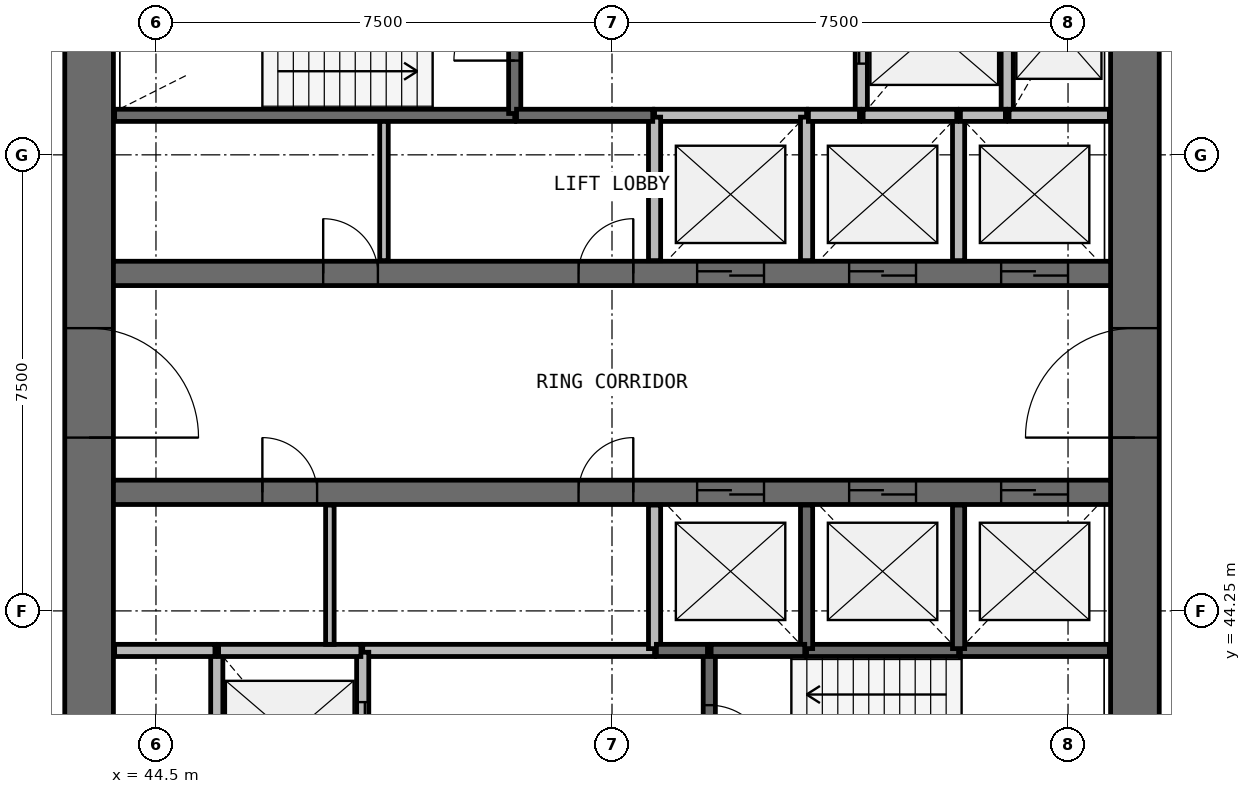
"""IFC4 building model, lengths in metres.
Left out: names, types, materials, properties, quantities, classifications, styles, units other than length and angle.
Written with IfcOpenShell. Run it as: python <this file> out.ifc"""

import sys

from ifc_helpers import new_model, si_unit, direction, frame, frame_2d, origin, place, context, subcontext, project, spatial, rectangle, extrude, source, transform, mapped, element, fill, save


model = new_model("IFC4")
c1 = context("Model", 3, precision=1e-05, world=origin(), true_north=direction((0.0, 1.0)))
c2 = subcontext(c1, "Body", "Model", "MODEL_VIEW")
j1 = project(units=[si_unit("LENGTHUNIT", "METRE"), si_unit("PLANEANGLEUNIT", "RADIAN")], contexts=[c1])
p1 = place(None, origin())
s1 = spatial("IfcSite", under=j1, at=p1, CompositionType="ELEMENT")
p2 = place(p1, origin())
s2 = spatial("IfcBuilding", under=s1, at=p2, CompositionType="ELEMENT")
p3 = place(p2, frame((0.0, 0.0, 152.6)))
s3 = spatial("IfcBuildingStorey", under=s2, at=p3, CompositionType="ELEMENT", Elevation=152.6)
p4 = place(p3, frame((60.6, 40.0, 0.0), z_axis=(0.0, 0.0, 1.0), x_axis=(0.0, 1.0, 0.0)))
e1 = element("IfcWall", 1, at=p4, inside=s3, PredefinedType="SHEAR", context=c2, shape_type="SweptSolid", body=[
    extrude(rectangle(XDim=16.0, YDim=0.8, at=frame_2d((8.0, 0.0))), origin(), (0.0, 0.0, 1.0), 3.9),
])
p5 = place(p4, frame((7.1, 0.0, 0.0)))
e2 = element("IfcOpeningElement", 2, at=p5, cuts=e1, PredefinedType="OPENING", context=c2, shape_type="SweptSolid", body=[
    extrude(rectangle(XDim=1.8, YDim=2.1, at=frame_2d((0.9, 1.05))), frame((0.0, 0.41, 0.0), z_axis=(0.0, -1.0, 0.0), x_axis=(1.0, 0.0, 0.0)), (0.0, 0.0, 1.0), 0.82),
])
p6 = place(p3, frame((43.4, 56.0, 0.0), z_axis=(0.0, 0.0, 1.0), x_axis=(0.0, -1.0, 0.0)))
e3 = element("IfcWall", 3, at=p6, inside=s3, PredefinedType="SHEAR", context=c2, shape_type="SweptSolid", body=[
    extrude(rectangle(XDim=16.0, YDim=0.8, at=frame_2d((8.0, 0.0))), origin(), (0.0, 0.0, 1.0), 3.9),
])
p7 = place(p6, frame((7.1, 0.0, 0.0)))
e4 = element("IfcOpeningElement", 4, at=p7, cuts=e3, PredefinedType="OPENING", context=c2, shape_type="SweptSolid", body=[
    extrude(rectangle(XDim=1.8, YDim=2.1, at=frame_2d((0.9, 1.05))), frame((0.0, 0.41, 0.0), z_axis=(0.0, -1.0, 0.0), x_axis=(1.0, 0.0, 0.0)), (0.0, 0.0, 1.0), 0.82),
])
p8 = place(p3, frame((43.8, 49.8, 0.0), z_axis=(0.0, 0.0, 1.0), x_axis=(1.0, 0.0, 0.0)))
e5 = element("IfcWall", 5, at=p8, inside=s3, PredefinedType="SHEAR", context=c2, shape_type="SweptSolid", body=[
    extrude(rectangle(XDim=16.4, YDim=0.4, at=frame_2d((8.2, 0.0))), origin(), (0.0, 0.0, 1.0), 3.9),
])
p9 = place(p8, frame((9.6, 0.0, 0.0)))
e6 = element("IfcOpeningElement", 6, at=p9, cuts=e5, PredefinedType="OPENING", context=c2, shape_type="SweptSolid", body=[
    extrude(rectangle(XDim=1.1, YDim=2.1, at=frame_2d((0.55, 1.05))), frame((0.0, 0.21, 0.0), z_axis=(0.0, -1.0, 0.0), x_axis=(1.0, 0.0, 0.0)), (0.0, 0.0, 1.0), 0.42),
])
p10 = place(p8, frame((12.1, 0.0, 0.0)))
e7 = element("IfcOpeningElement", 7, at=p10, cuts=e5, PredefinedType="OPENING", context=c2, shape_type="SweptSolid", body=[
    extrude(rectangle(XDim=1.1, YDim=2.1, at=frame_2d((0.55, 1.05))), frame((0.0, 0.21, 0.0), z_axis=(0.0, -1.0, 0.0), x_axis=(1.0, 0.0, 0.0)), (0.0, 0.0, 1.0), 0.42),
])
p11 = place(p8, frame((14.6, 0.0, 0.0)))
e8 = element("IfcOpeningElement", 8, at=p11, cuts=e5, PredefinedType="OPENING", context=c2, shape_type="SweptSolid", body=[
    extrude(rectangle(XDim=1.1, YDim=2.1, at=frame_2d((0.55, 1.05))), frame((0.0, 0.21, 0.0), z_axis=(0.0, -1.0, 0.0), x_axis=(1.0, 0.0, 0.0)), (0.0, 0.0, 1.0), 0.42),
])
p12 = place(p8, frame((3.45, 0.0, 0.0)))
e9 = element("IfcOpeningElement", 9, at=p12, cuts=e5, PredefinedType="OPENING", context=c2, shape_type="SweptSolid", body=[
    extrude(rectangle(XDim=0.9, YDim=2.1, at=frame_2d((0.45, 1.05))), frame((0.0, 0.21, 0.0), z_axis=(0.0, -1.0, 0.0), x_axis=(1.0, 0.0, 0.0)), (0.0, 0.0, 1.0), 0.42),
])
p13 = place(p8, frame((7.65, 0.0, 0.0)))
e10 = element("IfcOpeningElement", 10, at=p13, cuts=e5, PredefinedType="OPENING", context=c2, shape_type="SweptSolid", body=[
    extrude(rectangle(XDim=0.9, YDim=2.1, at=frame_2d((0.45, 1.05))), frame((0.0, 0.21, 0.0), z_axis=(0.0, -1.0, 0.0), x_axis=(1.0, 0.0, 0.0)), (0.0, 0.0, 1.0), 0.42),
])
p14 = place(p3, frame((43.8, 46.2, 0.0), z_axis=(0.0, 0.0, 1.0), x_axis=(1.0, 0.0, 0.0)))
e11 = element("IfcWall", 11, at=p14, inside=s3, PredefinedType="SHEAR", context=c2, shape_type="SweptSolid", body=[
    extrude(rectangle(XDim=16.4, YDim=0.4, at=frame_2d((8.2, 0.0))), origin(), (0.0, 0.0, 1.0), 3.9),
])
p15 = place(p14, frame((9.6, 0.0, 0.0)))
e12 = element("IfcOpeningElement", 12, at=p15, cuts=e11, PredefinedType="OPENING", context=c2, shape_type="SweptSolid", body=[
    extrude(rectangle(XDim=1.1, YDim=2.1, at=frame_2d((0.55, 1.05))), frame((0.0, 0.21, 0.0), z_axis=(0.0, -1.0, 0.0), x_axis=(1.0, 0.0, 0.0)), (0.0, 0.0, 1.0), 0.42),
])
p16 = place(p14, frame((12.1, 0.0, 0.0)))
e13 = element("IfcOpeningElement", 13, at=p16, cuts=e11, PredefinedType="OPENING", context=c2, shape_type="SweptSolid", body=[
    extrude(rectangle(XDim=1.1, YDim=2.1, at=frame_2d((0.55, 1.05))), frame((0.0, 0.21, 0.0), z_axis=(0.0, -1.0, 0.0), x_axis=(1.0, 0.0, 0.0)), (0.0, 0.0, 1.0), 0.42),
])
p17 = place(p14, frame((14.6, 0.0, 0.0)))
e14 = element("IfcOpeningElement", 14, at=p17, cuts=e11, PredefinedType="OPENING", context=c2, shape_type="SweptSolid", body=[
    extrude(rectangle(XDim=1.1, YDim=2.1, at=frame_2d((0.55, 1.05))), frame((0.0, 0.21, 0.0), z_axis=(0.0, -1.0, 0.0), x_axis=(1.0, 0.0, 0.0)), (0.0, 0.0, 1.0), 0.42),
])
p18 = place(p14, frame((2.45, 0.0, 0.0)))
e15 = element("IfcOpeningElement", 15, at=p18, cuts=e11, PredefinedType="OPENING", context=c2, shape_type="SweptSolid", body=[
    extrude(rectangle(XDim=0.9, YDim=2.1, at=frame_2d((0.45, 1.05))), frame((0.0, 0.21, 0.0), z_axis=(0.0, -1.0, 0.0), x_axis=(1.0, 0.0, 0.0)), (0.0, 0.0, 1.0), 0.42),
])
p19 = place(p14, frame((7.65, 0.0, 0.0)))
e16 = element("IfcOpeningElement", 16, at=p19, cuts=e11, PredefinedType="OPENING", context=c2, shape_type="SweptSolid", body=[
    extrude(rectangle(XDim=0.9, YDim=2.1, at=frame_2d((0.45, 1.05))), frame((0.0, 0.21, 0.0), z_axis=(0.0, -1.0, 0.0), x_axis=(1.0, 0.0, 0.0)), (0.0, 0.0, 1.0), 0.42),
])
p20 = place(p3, frame((43.82, 52.4, 0.0), z_axis=(0.0, 0.0, 1.0), x_axis=(1.0, 0.0, 0.0)))
e17 = element("IfcWall", 17, at=p20, inside=s3, PredefinedType="SOLIDWALL", context=c2, shape_type="SweptSolid", body=[
    extrude(rectangle(XDim=6.58, YDim=0.2, at=frame_2d((3.29, 0.0))), origin(), (0.0, 0.0, 1.0), 3.58),
])
p21 = place(p3, frame((52.7, 43.6, 0.0), z_axis=(0.0, 0.0, 1.0), x_axis=(-1.0, 0.0, 0.0)))
e18 = element("IfcWall", 18, at=p21, inside=s3, PredefinedType="SOLIDWALL", context=c2, shape_type="SweptSolid", body=[
    extrude(rectangle(XDim=4.8, YDim=0.2, at=frame_2d((2.4, 0.0))), origin(), (0.0, 0.0, 1.0), 3.58),
])
p22 = place(p3, frame((45.5, 43.6, 0.0), z_axis=(0.0, 0.0, 1.0), x_axis=(0.0, -1.0, 0.0)))
e19 = element("IfcWall", 19, at=p22, inside=s3, PredefinedType="SOLIDWALL", context=c2, shape_type="SweptSolid", body=[
    extrude(rectangle(XDim=2.78, YDim=0.2, at=frame_2d((1.39, 0.0))), origin(), (0.0, 0.0, 1.0), 3.58),
])
p23 = place(p3, frame((47.9, 40.82, 0.0), z_axis=(0.0, 0.0, 1.0), x_axis=(0.0, 1.0, 0.0)))
e20 = element("IfcWall", 20, at=p23, inside=s3, PredefinedType="SOLIDWALL", context=c2, shape_type="SweptSolid", body=[
    extrude(rectangle(XDim=2.75, YDim=0.2, at=frame_2d((1.375, 0.0))), origin(), (0.0, 0.0, 1.0), 3.58),
])
p24 = place(p23, frame((0.83, 0.0, 0.0)))
e21 = element("IfcOpeningElement", 21, at=p24, cuts=e20, PredefinedType="OPENING", context=c2, shape_type="SweptSolid", body=[
    extrude(rectangle(XDim=1.1, YDim=2.1, at=frame_2d((0.55, 1.05))), frame((0.0, 0.11, 0.0), z_axis=(0.0, -1.0, 0.0), x_axis=(1.0, 0.0, 0.0)), (0.0, 0.0, 1.0), 0.22),
])
p25 = place(p3, frame((50.4, 52.43, 0.0), z_axis=(0.0, 0.0, 1.0), x_axis=(0.0, 1.0, 0.0)))
e22 = element("IfcWall", 22, at=p25, inside=s3, PredefinedType="SOLIDWALL", context=c2, shape_type="SweptSolid", body=[
    extrude(rectangle(XDim=2.75, YDim=0.2, at=frame_2d((1.375, 0.0))), origin(), (0.0, 0.0, 1.0), 3.58),
])
p26 = place(p25, frame((0.87, 0.0, 0.0)))
e23 = element("IfcOpeningElement", 23, at=p26, cuts=e22, PredefinedType="OPENING", context=c2, shape_type="SweptSolid", body=[
    extrude(rectangle(XDim=1.0, YDim=2.1, at=frame_2d((0.5, 1.05))), frame((0.0, 0.11, 0.0), z_axis=(0.0, -1.0, 0.0), x_axis=(1.0, 0.0, 0.0)), (0.0, 0.0, 1.0), 0.22),
])
p27 = place(p3, frame((53.6, 43.6, 0.0), z_axis=(0.0, 0.0, 1.0), x_axis=(0.0, -1.0, 0.0)))
e24 = element("IfcWall", 24, at=p27, inside=s3, PredefinedType="SOLIDWALL", context=c2, shape_type="SweptSolid", body=[
    extrude(rectangle(XDim=2.78, YDim=0.2, at=frame_2d((1.39, 0.0))), origin(), (0.0, 0.0, 1.0), 3.58),
])
p28 = place(p27, frame((0.9, 0.0, 0.0)))
e25 = element("IfcOpeningElement", 25, at=p28, cuts=e24, PredefinedType="OPENING", context=c2, shape_type="SweptSolid", body=[
    extrude(rectangle(XDim=1.0, YDim=2.1, at=frame_2d((0.5, 1.05))), frame((0.0, 0.11, 0.0), z_axis=(0.0, -1.0, 0.0), x_axis=(1.0, 0.0, 0.0)), (0.0, 0.0, 1.0), 0.22),
])
p29 = place(p3, frame((56.1, 55.18, 0.0), z_axis=(0.0, 0.0, 1.0), x_axis=(0.0, -1.0, 0.0)))
e26 = element("IfcWall", 26, at=p29, inside=s3, PredefinedType="SOLIDWALL", context=c2, shape_type="SweptSolid", body=[
    extrude(rectangle(XDim=2.78, YDim=0.2, at=frame_2d((1.39, 0.0))), origin(), (0.0, 0.0, 1.0), 3.58),
])
p30 = place(p29, frame((0.83, 0.0, 0.0)))
e27 = element("IfcOpeningElement", 27, at=p30, cuts=e26, PredefinedType="OPENING", context=c2, shape_type="SweptSolid", body=[
    extrude(rectangle(XDim=1.1, YDim=2.1, at=frame_2d((0.55, 1.05))), frame((0.0, 0.11, 0.0), z_axis=(0.0, -1.0, 0.0), x_axis=(1.0, 0.0, 0.0)), (0.0, 0.0, 1.0), 0.22),
])
p31 = place(p3, frame((58.5, 52.4, 0.0), z_axis=(0.0, 0.0, 1.0), x_axis=(0.0, 1.0, 0.0)))
e28 = element("IfcWall", 28, at=p31, inside=s3, PredefinedType="SOLIDWALL", context=c2, shape_type="SweptSolid", body=[
    extrude(rectangle(XDim=2.78, YDim=0.2, at=frame_2d((1.39, 0.0))), origin(), (0.0, 0.0, 1.0), 3.58),
])
for number, where, z_axis, x_axis in (
    (29, (55.2, 52.4, 0.0), (0.0, 0.0, 1.0), (-1.0, 0.0, 0.0)),
    (30, (55.2, 43.6, 0.0), (0.0, 0.0, 1.0), (1.0, 0.0, 0.0)),
):
    element("IfcWall", number, at=place(p3, frame(where, z_axis=z_axis, x_axis=x_axis)), inside=s3, PredefinedType="SOLIDWALL", context=c2, shape_type="SweptSolid", body=[
        extrude(rectangle(XDim=2.5, YDim=0.2, at=frame_2d((1.25, 0.0))), origin(), (0.0, 0.0, 1.0), 3.58),
    ])
p32 = place(p3, frame((57.73, 43.6, 0.0), z_axis=(0.0, 0.0, 1.0), x_axis=(1.0, 0.0, 0.0)))
e31 = element("IfcWall", 31, at=p32, inside=s3, PredefinedType="SOLIDWALL", context=c2, shape_type="SweptSolid", body=[
    extrude(rectangle(XDim=2.45, YDim=0.2, at=frame_2d((1.225, 0.0))), origin(), (0.0, 0.0, 1.0), 3.58),
])
p33 = place(p3, frame((47.87, 43.6, 0.0), z_axis=(0.0, 0.0, 1.0), x_axis=(-1.0, 0.0, 0.0)))
e32 = element("IfcWall", 32, at=p33, inside=s3, PredefinedType="SOLIDWALL", context=c2, shape_type="SweptSolid", body=[
    extrude(rectangle(XDim=2.34, YDim=0.2, at=frame_2d((1.17, 0.0))), origin(), (0.0, 0.0, 1.0), 3.58),
])
for number, where, z_axis, x_axis in (
    (33, (52.7, 45.99, 0.0), (0.0, 0.0, 1.0), (0.0, -1.0, 0.0)),
    (34, (52.7, 52.37, 0.0), (0.0, 0.0, 1.0), (0.0, -1.0, 0.0)),
    (35, (55.2, 43.63, 0.0), (0.0, 0.0, 1.0), (0.0, 1.0, 0.0)),
    (36, (55.2, 50.01, 0.0), (0.0, 0.0, 1.0), (0.0, 1.0, 0.0)),
    (37, (57.7, 43.63, 0.0), (0.0, 0.0, 1.0), (0.0, 1.0, 0.0)),
):
    element("IfcWall", number, at=place(p3, frame(where, z_axis=z_axis, x_axis=x_axis)), inside=s3, PredefinedType="SOLIDWALL", context=c2, shape_type="SweptSolid", body=[
        extrude(rectangle(XDim=2.36, YDim=0.2, at=frame_2d((1.18, 0.0))), origin(), (0.0, 0.0, 1.0), 3.58),
    ])
p34 = place(p3, frame((57.7, 50.01, 0.0), z_axis=(0.0, 0.0, 1.0), x_axis=(0.0, 1.0, 0.0)))
e38 = element("IfcWall", 38, at=p34, inside=s3, PredefinedType="SOLIDWALL", context=c2, shape_type="SweptSolid", body=[
    extrude(rectangle(XDim=2.39, YDim=0.2, at=frame_2d((1.195, 0.0))), origin(), (0.0, 0.0, 1.0), 3.58),
])
p35 = place(p3, frame((50.43, 52.4, 0.0), z_axis=(0.0, 0.0, 1.0), x_axis=(1.0, 0.0, 0.0)))
e39 = element("IfcWall", 39, at=p35, inside=s3, PredefinedType="SOLIDWALL", context=c2, shape_type="SweptSolid", body=[
    extrude(rectangle(XDim=2.24, YDim=0.2, at=frame_2d((1.12, 0.0))), origin(), (0.0, 0.0, 1.0), 3.58),
])
for number, where, z_axis, x_axis in (
    (40, (45.47, 43.6, 0.0), (0.0, 0.0, 1.0), (-1.0, 0.0, 0.0)),
    (41, (60.18, 52.4, 0.0), (0.0, 0.0, 1.0), (-1.0, 0.0, 0.0)),
):
    element("IfcWall", number, at=place(p3, frame(where, z_axis=z_axis, x_axis=x_axis)), inside=s3, PredefinedType="SOLIDWALL", context=c2, shape_type="SweptSolid", body=[
        extrude(rectangle(XDim=1.65, YDim=0.2, at=frame_2d((0.825, 0.0))), origin(), (0.0, 0.0, 1.0), 3.58),
    ])
for number, where, z_axis, x_axis in (
    (42, (53.63, 43.6, 0.0), (0.0, 0.0, 1.0), (1.0, 0.0, 0.0)),
    (43, (57.67, 52.4, 0.0), (0.0, 0.0, 1.0), (-1.0, 0.0, 0.0)),
):
    element("IfcWall", number, at=place(p3, frame(where, z_axis=z_axis, x_axis=x_axis)), inside=s3, PredefinedType="SOLIDWALL", context=c2, shape_type="SweptSolid", body=[
        extrude(rectangle(XDim=1.54, YDim=0.2, at=frame_2d((0.77, 0.0))), origin(), (0.0, 0.0, 1.0), 3.58),
    ])
for number, where, z_axis, x_axis in (
    (44, (52.73, 43.6, 0.0), (0.0, 0.0, 1.0), (1.0, 0.0, 0.0)),
    (45, (56.07, 52.4, 0.0), (0.0, 0.0, 1.0), (-1.0, 0.0, 0.0)),
):
    element("IfcWall", number, at=place(p3, frame(where, z_axis=z_axis, x_axis=x_axis)), inside=s3, PredefinedType="SOLIDWALL", context=c2, shape_type="SweptSolid", body=[
        extrude(rectangle(XDim=0.84, YDim=0.2, at=frame_2d((0.42, 0.0))), origin(), (0.0, 0.0, 1.0), 3.58),
    ])
p36 = place(p3, frame((58.47, 52.4, 0.0), z_axis=(0.0, 0.0, 1.0), x_axis=(-1.0, 0.0, 0.0)))
e46 = element("IfcWall", 46, at=p36, inside=s3, PredefinedType="SOLIDWALL", context=c2, shape_type="SweptSolid", body=[
    extrude(rectangle(XDim=0.74, YDim=0.2, at=frame_2d((0.37, 0.0))), origin(), (0.0, 0.0, 1.0), 3.58),
])
for number, where, z_axis, x_axis in (
    (47, (47.36, 43.7, 0.0), (0.0, 0.0, 1.0), (0.0, 1.0, 0.0)),
    (48, (48.25, 50.01, 0.0), (0.0, 0.0, 1.0), (0.0, 1.0, 0.0)),
):
    element("IfcWall", number, at=place(p3, frame(where, z_axis=z_axis, x_axis=x_axis)), inside=s3, PredefinedType="PARTITIONING", context=c2, shape_type="SweptSolid", body=[
        extrude(rectangle(XDim=2.29, YDim=0.14, at=frame_2d((1.145, 0.0))), origin(), (0.0, 0.0, 1.0), 2.88),
    ])
m1 = source(origin(), c2, "Body", "SweptSolid", [
    extrude(rectangle(XDim=1.8, YDim=2.1, at=frame_2d((0.9, 1.05))), frame((0.0, 0.025, 0.0), z_axis=(0.0, -1.0, 0.0), x_axis=(1.0, 0.0, 0.0)), (0.0, 0.0, 1.0), 0.05),
])
p37 = place(p7, origin())
e49 = element("IfcDoor", 49, at=p37, inside=s3, OperationType="SINGLE_SWING_RIGHT", PredefinedType="DOOR", context=c2, shape_type="MappedRepresentation", body=[
    mapped(m1, transform((0.0, 0.0, 0.0), scale=1.0)),
])
fill(e4, e49)
p38 = place(p5, origin())
e50 = element("IfcDoor", 50, at=p38, inside=s3, OperationType="SINGLE_SWING_LEFT", PredefinedType="DOOR", context=c2, shape_type="MappedRepresentation", body=[
    mapped(m1, transform((0.0, 0.0, 0.0), scale=1.0)),
])
fill(e2, e50)
m2 = source(origin(), c2, "Body", "SweptSolid", [
    extrude(rectangle(XDim=1.1, YDim=2.1, at=frame_2d((0.55, 1.05))), frame((0.0, 0.025, 0.0), z_axis=(0.0, -1.0, 0.0), x_axis=(1.0, 0.0, 0.0)), (0.0, 0.0, 1.0), 0.05),
])
p39 = place(p9, origin())
e51 = element("IfcDoor", 51, at=p39, inside=s3, OperationType="DOUBLE_DOOR_SLIDING", PredefinedType="USERDEFINED", context=c2, shape_type="MappedRepresentation", body=[
    mapped(m2, transform((0.0, 0.0, 0.0), scale=1.0)),
])
fill(e6, e51)
p40 = place(p10, origin())
e52 = element("IfcDoor", 52, at=p40, inside=s3, OperationType="DOUBLE_DOOR_SLIDING", PredefinedType="USERDEFINED", context=c2, shape_type="MappedRepresentation", body=[
    mapped(m2, transform((0.0, 0.0, 0.0), scale=1.0)),
])
fill(e7, e52)
p41 = place(p11, origin())
e53 = element("IfcDoor", 53, at=p41, inside=s3, OperationType="DOUBLE_DOOR_SLIDING", PredefinedType="USERDEFINED", context=c2, shape_type="MappedRepresentation", body=[
    mapped(m2, transform((0.0, 0.0, 0.0), scale=1.0)),
])
fill(e8, e53)
p42 = place(p15, origin())
e54 = element("IfcDoor", 54, at=p42, inside=s3, OperationType="DOUBLE_DOOR_SLIDING", PredefinedType="USERDEFINED", context=c2, shape_type="MappedRepresentation", body=[
    mapped(m2, transform((0.0, 0.0, 0.0), scale=1.0)),
])
fill(e12, e54)
p43 = place(p16, origin())
e55 = element("IfcDoor", 55, at=p43, inside=s3, OperationType="DOUBLE_DOOR_SLIDING", PredefinedType="USERDEFINED", context=c2, shape_type="MappedRepresentation", body=[
    mapped(m2, transform((0.0, 0.0, 0.0), scale=1.0)),
])
fill(e13, e55)
p44 = place(p17, origin())
e56 = element("IfcDoor", 56, at=p44, inside=s3, OperationType="DOUBLE_DOOR_SLIDING", PredefinedType="USERDEFINED", context=c2, shape_type="MappedRepresentation", body=[
    mapped(m2, transform((0.0, 0.0, 0.0), scale=1.0)),
])
fill(e14, e56)
p45 = place(p30, origin())
e57 = element("IfcDoor", 57, at=p45, inside=s3, OperationType="DOUBLE_DOOR_SLIDING", PredefinedType="USERDEFINED", context=c2, shape_type="MappedRepresentation", body=[
    mapped(m2, transform((0.0, 0.0, 0.0), scale=1.0)),
])
fill(e27, e57)
p46 = place(p24, origin())
e58 = element("IfcDoor", 58, at=p46, inside=s3, OperationType="DOUBLE_DOOR_SLIDING", PredefinedType="USERDEFINED", context=c2, shape_type="MappedRepresentation", body=[
    mapped(m2, transform((0.0, 0.0, 0.0), scale=1.0)),
])
fill(e21, e58)
m3 = source(origin(), c2, "Body", "SweptSolid", [
    extrude(rectangle(XDim=1.0, YDim=2.1, at=frame_2d((0.5, 1.05))), frame((0.0, 0.025, 0.0), z_axis=(0.0, -1.0, 0.0), x_axis=(1.0, 0.0, 0.0)), (0.0, 0.0, 1.0), 0.05),
])
p47 = place(p26, origin())
e59 = element("IfcDoor", 59, at=p47, inside=s3, OperationType="SINGLE_SWING_LEFT", PredefinedType="DOOR", context=c2, shape_type="MappedRepresentation", body=[
    mapped(m3, transform((0.0, 0.0, 0.0), scale=1.0)),
])
fill(e23, e59)
p48 = place(p28, origin())
e60 = element("IfcDoor", 60, at=p48, inside=s3, OperationType="SINGLE_SWING_RIGHT", PredefinedType="DOOR", context=c2, shape_type="MappedRepresentation", body=[
    mapped(m3, transform((0.0, 0.0, 0.0), scale=1.0)),
])
fill(e25, e60)
m4 = source(origin(), c2, "Body", "SweptSolid", [
    extrude(rectangle(XDim=0.9, YDim=2.1, at=frame_2d((0.45, 1.05))), frame((0.0, 0.025, 0.0), z_axis=(0.0, -1.0, 0.0), x_axis=(1.0, 0.0, 0.0)), (0.0, 0.0, 1.0), 0.05),
])
p49 = place(p12, origin())
e61 = element("IfcDoor", 61, at=p49, inside=s3, OperationType="SINGLE_SWING_LEFT", PredefinedType="DOOR", context=c2, shape_type="MappedRepresentation", body=[
    mapped(m4, transform((0.0, 0.0, 0.0), scale=1.0)),
])
fill(e9, e61)
p50 = place(p13, origin())
e62 = element("IfcDoor", 62, at=p50, inside=s3, OperationType="SINGLE_SWING_RIGHT", PredefinedType="DOOR", context=c2, shape_type="MappedRepresentation", body=[
    mapped(m4, transform((0.0, 0.0, 0.0), scale=1.0)),
])
fill(e10, e62)
p51 = place(p18, origin())
e63 = element("IfcDoor", 63, at=p51, inside=s3, OperationType="SINGLE_SWING_LEFT", PredefinedType="DOOR", context=c2, shape_type="MappedRepresentation", body=[
    mapped(m4, transform((0.0, 0.0, 0.0), scale=1.0)),
])
fill(e15, e63)
p52 = place(p19, origin())
e64 = element("IfcDoor", 64, at=p52, inside=s3, OperationType="SINGLE_SWING_RIGHT", PredefinedType="DOOR", context=c2, shape_type="MappedRepresentation", body=[
    mapped(m4, transform((0.0, 0.0, 0.0), scale=1.0)),
])
fill(e16, e64)
save(model, sys.argv[1])
